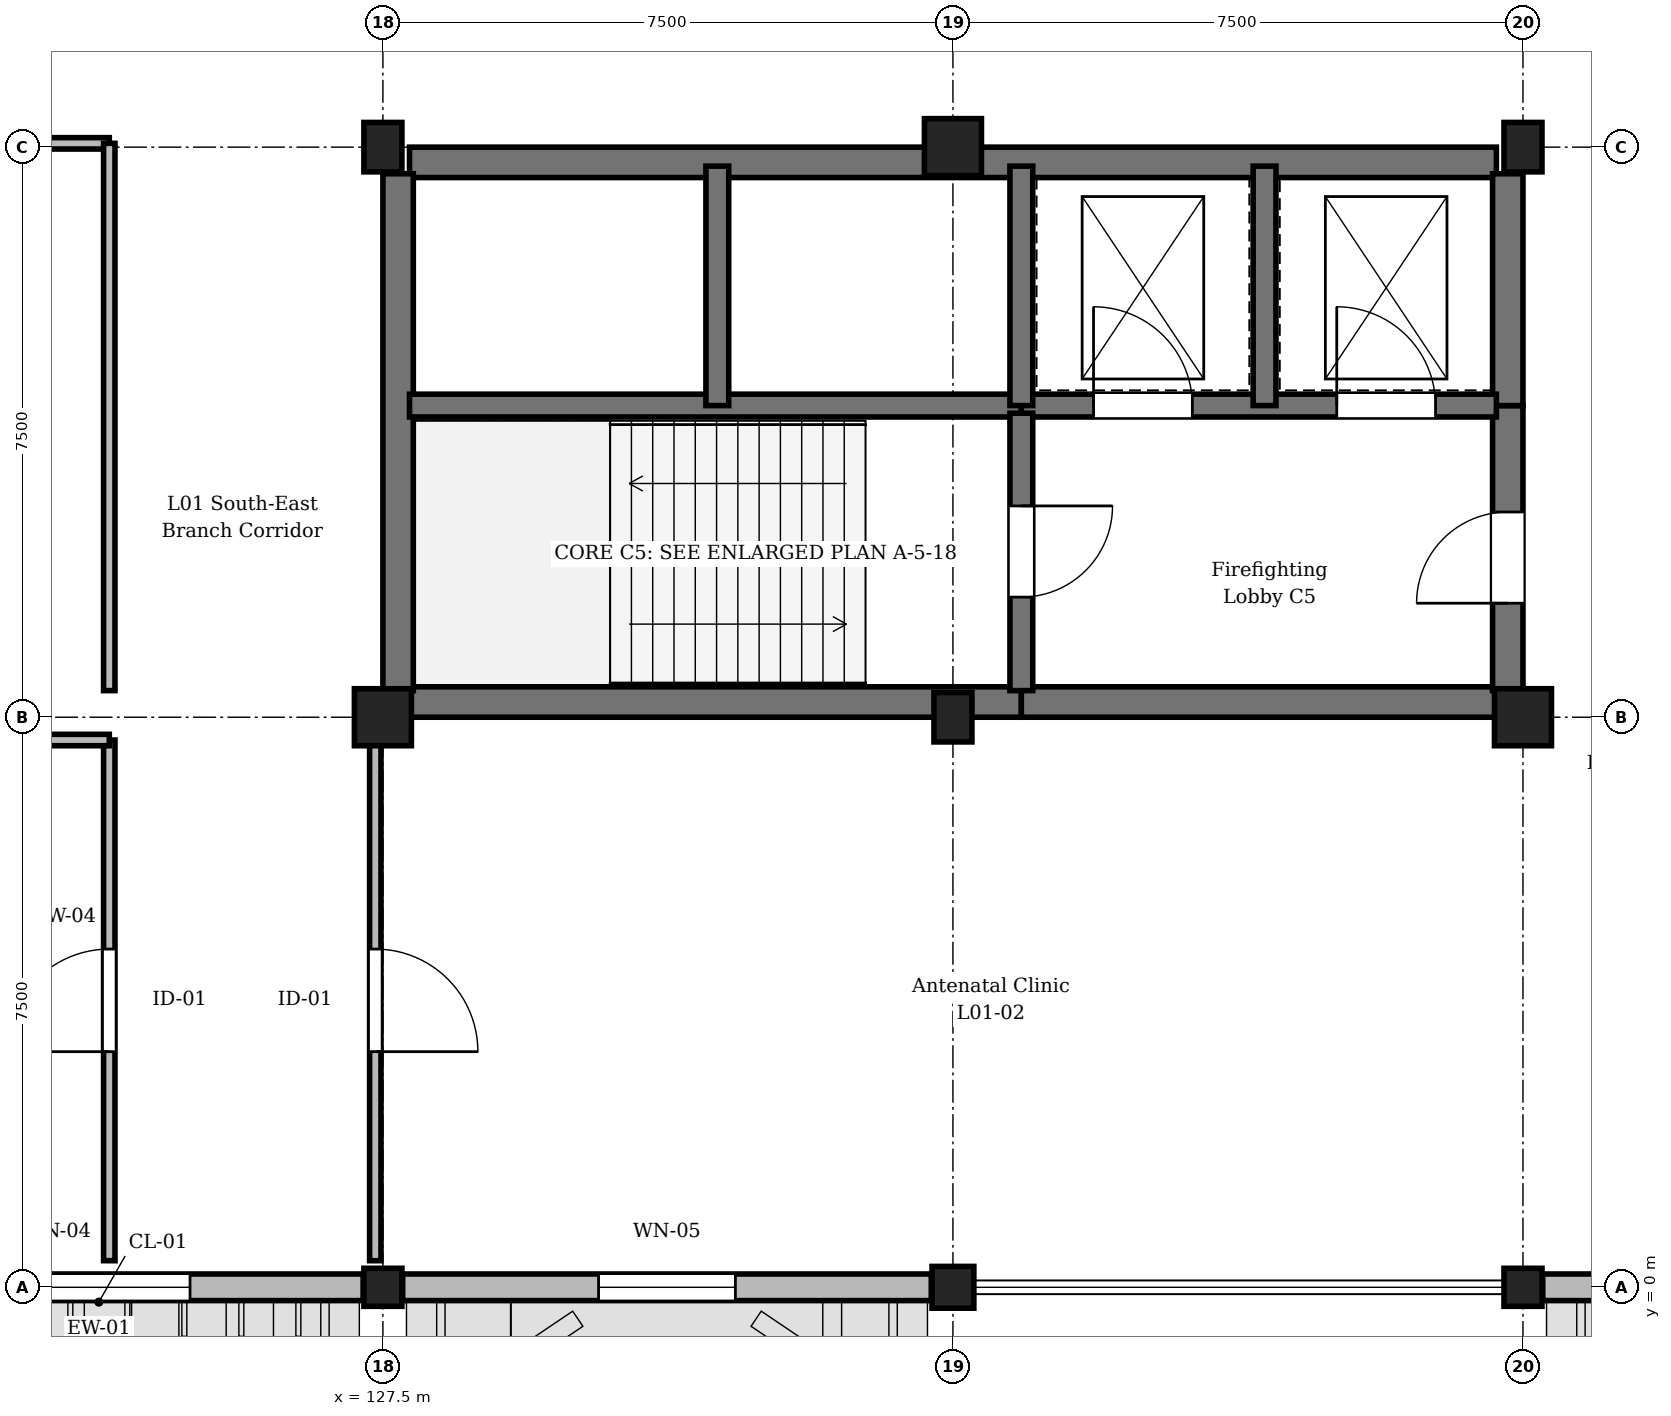
"""IFC4 building model, lengths in metres.
Left out: names, types, materials, properties, quantities, classifications, styles, units other than length and angle.
Written with IfcOpenShell. Run it as: python <this file> out.ifc"""

import sys

from ifc_helpers import new_model, si_unit, direction, frame, frame_2d, origin, origin_2d, place, context, subcontext, project, spatial, rectangle, extrude, element, fill, save


model = new_model("IFC4")
c1 = context("Model", 3, precision=1e-05, world=origin(), true_north=direction((0.0, 1.0)))
c2 = subcontext(c1, "Body", "Model", "MODEL_VIEW")
j1 = project(units=[si_unit("LENGTHUNIT", "METRE"), si_unit("PLANEANGLEUNIT", "RADIAN")], contexts=[c1])
p1 = place(None, origin())
s1 = spatial("IfcSite", under=j1, at=p1, CompositionType="ELEMENT")
p2 = place(p1, origin())
s2 = spatial("IfcBuilding", under=s1, at=p2, CompositionType="ELEMENT")
p3 = place(p2, frame((0.0, 0.0, 4.8)))
s3 = spatial("IfcBuildingStorey", under=s2, at=p3, CompositionType="ELEMENT", Elevation=4.8)
p4 = place(p3, frame((127.5, 0.0, 0.0), z_axis=(0.0, 0.0, 1.0), x_axis=(1.0, 0.0, 0.0)))
e1 = element("IfcColumn", 1, at=p4, inside=s3, PredefinedType="COLUMN", context=c2, shape_type="SweptSolid", body=[
    extrude(rectangle(XDim=0.5, YDim=0.5, at=origin_2d()), origin(), (0.0, 0.0, 1.0), 4.5),
])
p5 = place(p3, frame((127.5, 7.5, 0.0), z_axis=(0.0, 0.0, 1.0), x_axis=(1.0, 0.0, 0.0)))
e2 = element("IfcColumn", 2, at=p5, inside=s3, PredefinedType="COLUMN", context=c2, shape_type="SweptSolid", body=[
    extrude(rectangle(XDim=0.75, YDim=0.75, at=origin_2d()), origin(), (0.0, 0.0, 1.0), 4.5),
])
p6 = place(p3, frame((127.5, 15.0, 0.0), z_axis=(0.0, 0.0, 1.0), x_axis=(1.0, 0.0, 0.0)))
e3 = element("IfcColumn", 3, at=p6, inside=s3, PredefinedType="COLUMN", context=c2, shape_type="SweptSolid", body=[
    extrude(rectangle(XDim=0.5, YDim=0.65, at=origin_2d()), origin(), (0.0, 0.0, 1.0), 4.5),
])
p7 = place(p3, frame((135.0, 0.0, 0.0), z_axis=(0.0, 0.0, 1.0), x_axis=(1.0, 0.0, 0.0)))
e4 = element("IfcColumn", 4, at=p7, inside=s3, PredefinedType="COLUMN", context=c2, shape_type="SweptSolid", body=[
    extrude(rectangle(XDim=0.55, YDim=0.55, at=origin_2d()), origin(), (0.0, 0.0, 1.0), 4.5),
])
p8 = place(p3, frame((135.0, 7.5, 0.0), z_axis=(0.0, 0.0, 1.0), x_axis=(1.0, 0.0, 0.0)))
e5 = element("IfcColumn", 5, at=p8, inside=s3, PredefinedType="COLUMN", context=c2, shape_type="SweptSolid", body=[
    extrude(rectangle(XDim=0.5, YDim=0.65, at=origin_2d()), origin(), (0.0, 0.0, 1.0), 4.5),
])
p9 = place(p3, frame((135.0, 15.0, 0.0), z_axis=(0.0, 0.0, 1.0), x_axis=(1.0, 0.0, 0.0)))
e6 = element("IfcColumn", 6, at=p9, inside=s3, PredefinedType="COLUMN", context=c2, shape_type="SweptSolid", body=[
    extrude(rectangle(XDim=0.75, YDim=0.75, at=origin_2d()), origin(), (0.0, 0.0, 1.0), 4.5),
])
p10 = place(p3, frame((142.5, 0.0, 0.0), z_axis=(0.0, 0.0, 1.0), x_axis=(1.0, 0.0, 0.0)))
e7 = element("IfcColumn", 7, at=p10, inside=s3, PredefinedType="COLUMN", context=c2, shape_type="SweptSolid", body=[
    extrude(rectangle(XDim=0.5, YDim=0.5, at=origin_2d()), origin(), (0.0, 0.0, 1.0), 4.5),
])
p11 = place(p3, frame((142.5, 7.5, 0.0), z_axis=(0.0, 0.0, 1.0), x_axis=(1.0, 0.0, 0.0)))
e8 = element("IfcColumn", 8, at=p11, inside=s3, PredefinedType="COLUMN", context=c2, shape_type="SweptSolid", body=[
    extrude(rectangle(XDim=0.75, YDim=0.75, at=origin_2d()), origin(), (0.0, 0.0, 1.0), 4.5),
])
p12 = place(p3, frame((142.5, 15.0, 0.0), z_axis=(0.0, 0.0, 1.0), x_axis=(1.0, 0.0, 0.0)))
e9 = element("IfcColumn", 9, at=p12, inside=s3, PredefinedType="COLUMN", context=c2, shape_type="SweptSolid", body=[
    extrude(rectangle(XDim=0.5, YDim=0.65, at=origin_2d()), origin(), (0.0, 0.0, 1.0), 4.5),
])
p13 = place(p3, frame((127.24, 0.0, 0.0), z_axis=(0.0, 0.0, 1.0), x_axis=(-1.0, 0.0, 0.0)))
e10 = element("IfcWall", 10, at=p13, inside=s3, PredefinedType="STANDARD", context=c2, shape_type="SweptSolid", body=[
    extrude(rectangle(XDim=6.955, YDim=0.35, at=frame_2d((3.478, 0.0))), origin(), (0.0, 0.0, 1.0), 3.63),
])
p14 = place(p13, frame((2.278, 0.0, 0.9)))
e11 = element("IfcOpeningElement", 11, at=p14, cuts=e10, PredefinedType="OPENING", context=c2, shape_type="SweptSolid", body=[
    extrude(rectangle(XDim=2.4, YDim=2.45, at=frame_2d((1.2, 1.225))), frame((0.0, 0.185, 0.0), z_axis=(0.0, -1.0, 0.0), x_axis=(1.0, 0.0, 0.0)), (0.0, 0.0, 1.0), 0.37),
])
p15 = place(p3, frame((134.715, 0.0, 0.0), z_axis=(0.0, 0.0, 1.0), x_axis=(-1.0, 0.0, 0.0)))
e12 = element("IfcWall", 12, at=p15, inside=s3, PredefinedType="STANDARD", context=c2, shape_type="SweptSolid", body=[
    extrude(rectangle(XDim=6.955, YDim=0.35, at=frame_2d((3.478, 0.0))), origin(), (0.0, 0.0, 1.0), 3.63),
])
p16 = place(p15, frame((2.577, 0.0, 0.9)))
e13 = element("IfcOpeningElement", 13, at=p16, cuts=e12, PredefinedType="OPENING", context=c2, shape_type="SweptSolid", body=[
    extrude(rectangle(XDim=1.8, YDim=2.1, at=frame_2d((0.9, 1.05))), frame((0.0, 0.185, 0.0), z_axis=(0.0, -1.0, 0.0), x_axis=(1.0, 0.0, 0.0)), (0.0, 0.0, 1.0), 0.37),
])
p17 = place(p3, frame((149.715, 0.0, 0.0), z_axis=(0.0, 0.0, 1.0), x_axis=(-1.0, 0.0, 0.0)))
e14 = element("IfcWall", 14, at=p17, inside=s3, PredefinedType="STANDARD", context=c2, shape_type="SweptSolid", body=[
    extrude(rectangle(XDim=6.955, YDim=0.35, at=frame_2d((3.478, 0.0))), origin(), (0.0, 0.0, 1.0), 3.63),
])
p18 = place(p17, frame((2.877, 0.0, 0.9)))
e15 = element("IfcOpeningElement", 15, at=p18, cuts=e14, PredefinedType="OPENING", context=c2, shape_type="SweptSolid", body=[
    extrude(rectangle(XDim=1.2, YDim=2.1, at=frame_2d((0.6, 1.05))), frame((0.0, 0.185, 0.0), z_axis=(0.0, -1.0, 0.0), x_axis=(1.0, 0.0, 0.0)), (0.0, 0.0, 1.0), 0.37),
])
p19 = place(p3, frame((127.85, 7.7, 0.0), z_axis=(0.0, 0.0, 1.0), x_axis=(1.0, 0.0, 0.0)))
e16 = element("IfcWall", 16, at=p19, inside=s3, PredefinedType="SHEAR", context=c2, shape_type="SweptSolid", body=[
    extrude(rectangle(XDim=8.05, YDim=0.4, at=frame_2d((4.025, 0.0))), origin(), (0.0, 0.0, 1.0), 4.18),
])
p20 = place(p3, frame((135.9, 7.7, 0.0), z_axis=(0.0, 0.0, 1.0), x_axis=(1.0, 0.0, 0.0)))
e17 = element("IfcWall", 17, at=p20, inside=s3, PredefinedType="SHEAR", context=c2, shape_type="SweptSolid", body=[
    extrude(rectangle(XDim=6.25, YDim=0.4, at=frame_2d((3.125, 0.0))), origin(), (0.0, 0.0, 1.0), 4.18),
])
p21 = place(p3, frame((127.85, 14.8, 0.0), z_axis=(0.0, 0.0, 1.0), x_axis=(1.0, 0.0, 0.0)))
e18 = element("IfcWall", 18, at=p21, inside=s3, PredefinedType="SHEAR", context=c2, shape_type="SweptSolid", body=[
    extrude(rectangle(XDim=14.3, YDim=0.4, at=frame_2d((7.15, 0.0))), origin(), (0.0, 0.0, 1.0), 4.18),
])
p22 = place(p3, frame((127.7, 7.85, 0.0), z_axis=(0.0, 0.0, 1.0), x_axis=(0.0, 1.0, 0.0)))
e19 = element("IfcWall", 19, at=p22, inside=s3, PredefinedType="SHEAR", context=c2, shape_type="SweptSolid", body=[
    extrude(rectangle(XDim=6.8, YDim=0.4, at=frame_2d((3.4, 0.0))), origin(), (0.0, 0.0, 1.0), 4.18),
])
p23 = place(p3, frame((142.3, 7.85, 0.0), z_axis=(0.0, 0.0, 1.0), x_axis=(0.0, 1.0, 0.0)))
e20 = element("IfcWall", 20, at=p23, inside=s3, PredefinedType="SHEAR", context=c2, shape_type="SweptSolid", body=[
    extrude(rectangle(XDim=3.75, YDim=0.4, at=frame_2d((1.875, 0.0))), origin(), (0.0, 0.0, 1.0), 4.18),
])
p24 = place(p23, frame((1.15, 0.0, 0.0)))
e21 = element("IfcOpeningElement", 21, at=p24, cuts=e20, PredefinedType="OPENING", context=c2, shape_type="SweptSolid", body=[
    extrude(rectangle(XDim=1.2, YDim=2.25, at=frame_2d((0.6, 1.125))), frame((0.0, 0.21, 0.0), z_axis=(0.0, -1.0, 0.0), x_axis=(1.0, 0.0, 0.0)), (0.0, 0.0, 1.0), 0.42),
])
p25 = place(p3, frame((142.3, 11.6, 0.0), z_axis=(0.0, 0.0, 1.0), x_axis=(0.0, 1.0, 0.0)))
e22 = element("IfcWall", 22, at=p25, inside=s3, PredefinedType="SHEAR", context=c2, shape_type="SweptSolid", body=[
    extrude(rectangle(XDim=3.05, YDim=0.4, at=frame_2d((1.525, 0.0))), origin(), (0.0, 0.0, 1.0), 4.18),
])
p26 = place(p3, frame((127.85, 11.6, 0.0), z_axis=(0.0, 0.0, 1.0), x_axis=(1.0, 0.0, 0.0)))
e23 = element("IfcWall", 23, at=p26, inside=s3, PredefinedType="SHEAR", context=c2, shape_type="SweptSolid", body=[
    extrude(rectangle(XDim=8.05, YDim=0.3, at=frame_2d((4.025, 0.0))), origin(), (0.0, 0.0, 1.0), 4.18),
])
p27 = place(p3, frame((135.9, 11.6, 0.0), z_axis=(0.0, 0.0, 1.0), x_axis=(1.0, 0.0, 0.0)))
e24 = element("IfcWall", 24, at=p27, inside=s3, PredefinedType="SHEAR", context=c2, shape_type="SweptSolid", body=[
    extrude(rectangle(XDim=6.25, YDim=0.3, at=frame_2d((3.125, 0.0))), origin(), (0.0, 0.0, 1.0), 4.18),
])
p28 = place(p27, frame((0.95, 0.0, 0.0)))
e25 = element("IfcOpeningElement", 25, at=p28, cuts=e24, PredefinedType="OPENING", context=c2, shape_type="SweptSolid", body=[
    extrude(rectangle(XDim=1.3, YDim=2.2, at=frame_2d((0.65, 1.1))), frame((0.0, 0.16, 0.0), z_axis=(0.0, -1.0, 0.0), x_axis=(1.0, 0.0, 0.0)), (0.0, 0.0, 1.0), 0.32),
])
p29 = place(p27, frame((4.15, 0.0, 0.0)))
e26 = element("IfcOpeningElement", 26, at=p29, cuts=e24, PredefinedType="OPENING", context=c2, shape_type="SweptSolid", body=[
    extrude(rectangle(XDim=1.3, YDim=2.2, at=frame_2d((0.65, 1.1))), frame((0.0, 0.16, 0.0), z_axis=(0.0, -1.0, 0.0), x_axis=(1.0, 0.0, 0.0)), (0.0, 0.0, 1.0), 0.32),
])
p30 = place(p3, frame((135.9, 11.5, 0.0), z_axis=(0.0, 0.0, 1.0), x_axis=(0.0, -1.0, 0.0)))
e27 = element("IfcWall", 27, at=p30, inside=s3, PredefinedType="SHEAR", context=c2, shape_type="SweptSolid", body=[
    extrude(rectangle(XDim=3.65, YDim=0.3, at=frame_2d((1.825, 0.0))), origin(), (0.0, 0.0, 1.0), 4.18),
])
p31 = place(p30, frame((1.22, 0.0, 0.0)))
e28 = element("IfcOpeningElement", 28, at=p31, cuts=e27, PredefinedType="OPENING", context=c2, shape_type="SweptSolid", body=[
    extrude(rectangle(XDim=1.2, YDim=2.25, at=frame_2d((0.6, 1.125))), frame((0.0, 0.16, 0.0), z_axis=(0.0, -1.0, 0.0), x_axis=(1.0, 0.0, 0.0)), (0.0, 0.0, 1.0), 0.32),
])
for number, where, z_axis, x_axis in (
    (29, (131.9, 11.6, 0.0), (0.0, 0.0, 1.0), (0.0, 1.0, 0.0)),
    (30, (135.9, 11.6, 0.0), (0.0, 0.0, 1.0), (0.0, 1.0, 0.0)),
    (31, (139.1, 11.6, 0.0), (0.0, 0.0, 1.0), (0.0, 1.0, 0.0)),
):
    element("IfcWall", number, at=place(p3, frame(where, z_axis=z_axis, x_axis=x_axis)), inside=s3, PredefinedType="SHEAR", context=c2, shape_type="SweptSolid", body=[
        extrude(rectangle(XDim=3.15, YDim=0.3, at=frame_2d((1.575, 0.0))), origin(), (0.0, 0.0, 1.0), 4.18),
    ])
p32 = place(p3, frame((123.9, 0.35, 0.0), z_axis=(0.0, 0.0, 1.0), x_axis=(0.0, 1.0, 0.0)))
e32 = element("IfcWall", 32, at=p32, inside=s3, PredefinedType="PARTITIONING", context=c2, shape_type="SweptSolid", body=[
    extrude(rectangle(XDim=6.85, YDim=0.15, at=frame_2d((3.425, 0.0))), origin(), (0.0, 0.0, 1.0), 3.765),
])
p33 = place(p32, frame((2.75, 0.0, 0.0)))
e33 = element("IfcOpeningElement", 33, at=p33, cuts=e32, PredefinedType="OPENING", context=c2, shape_type="SweptSolid", body=[
    extrude(rectangle(XDim=1.35, YDim=2.25, at=frame_2d((0.675, 1.125))), frame((0.0, 0.085, 0.0), z_axis=(0.0, -1.0, 0.0), x_axis=(1.0, 0.0, 0.0)), (0.0, 0.0, 1.0), 0.17),
])
p34 = place(p3, frame((127.4, 7.2, 0.0), z_axis=(0.0, 0.0, 1.0), x_axis=(0.0, -1.0, 0.0)))
e34 = element("IfcWall", 34, at=p34, inside=s3, PredefinedType="PARTITIONING", context=c2, shape_type="SweptSolid", body=[
    extrude(rectangle(XDim=6.85, YDim=0.15, at=frame_2d((3.425, 0.0))), origin(), (0.0, 0.0, 1.0), 3.565),
])
p35 = place(p34, frame((2.75, 0.0, 0.0)))
e35 = element("IfcOpeningElement", 35, at=p35, cuts=e34, PredefinedType="OPENING", context=c2, shape_type="SweptSolid", body=[
    extrude(rectangle(XDim=1.35, YDim=2.25, at=frame_2d((0.675, 1.125))), frame((0.0, 0.085, 0.0), z_axis=(0.0, -1.0, 0.0), x_axis=(1.0, 0.0, 0.0)), (0.0, 0.0, 1.0), 0.17),
])
p36 = place(p3, frame((123.9, 15.05, 0.0), z_axis=(0.0, 0.0, 1.0), x_axis=(-1.0, 0.0, 0.0)))
e36 = element("IfcWall", 36, at=p36, inside=s3, PredefinedType="PARTITIONING", context=c2, shape_type="SweptSolid", body=[
    extrude(rectangle(XDim=11.05, YDim=0.15, at=frame_2d((5.525, 0.0))), origin(), (0.0, 0.0, 1.0), 3.515),
])
p37 = place(p36, frame((6.76, 0.0, 0.0)))
e37 = element("IfcOpeningElement", 37, at=p37, cuts=e36, PredefinedType="OPENING", context=c2, shape_type="SweptSolid", body=[
    extrude(rectangle(XDim=1.25, YDim=2.2, at=frame_2d((0.625, 1.1))), frame((0.0, 0.085, 0.0), z_axis=(0.0, -1.0, 0.0), x_axis=(1.0, 0.0, 0.0)), (0.0, 0.0, 1.0), 0.17),
])
p38 = place(p3, frame((112.85, 7.2, 0.0), z_axis=(0.0, 0.0, 1.0), x_axis=(1.0, 0.0, 0.0)))
e38 = element("IfcWall", 38, at=p38, inside=s3, PredefinedType="PARTITIONING", context=c2, shape_type="SweptSolid", body=[
    extrude(rectangle(XDim=11.05, YDim=0.15, at=frame_2d((5.525, 0.0))), origin(), (0.0, 0.0, 1.0), 3.515),
])
p39 = place(p3, frame((123.9, 7.85, 0.0), z_axis=(0.0, 0.0, 1.0), x_axis=(0.0, 1.0, 0.0)))
e39 = element("IfcWall", 39, at=p39, inside=s3, PredefinedType="PARTITIONING", context=c2, shape_type="SweptSolid", body=[
    extrude(rectangle(XDim=7.2, YDim=0.15, at=frame_2d((3.6, 0.0))), origin(), (0.0, 0.0, 1.0), 4.165),
])
p40 = place(p14, origin())
e40 = element("IfcWindow", 40, at=p40, inside=s3, PartitioningType="SINGLE_PANEL", PredefinedType="WINDOW", context=c2, shape_type="SweptSolid", body=[
    extrude(rectangle(XDim=2.4, YDim=2.45, at=frame_2d((1.2, 1.225))), frame((0.0, 0.03, 0.0), z_axis=(0.0, -1.0, 0.0), x_axis=(1.0, 0.0, 0.0)), (0.0, 0.0, 1.0), 0.06),
])
fill(e11, e40)
p41 = place(p16, origin())
e41 = element("IfcWindow", 41, at=p41, inside=s3, PartitioningType="SINGLE_PANEL", PredefinedType="WINDOW", context=c2, shape_type="SweptSolid", body=[
    extrude(rectangle(XDim=1.8, YDim=2.1, at=frame_2d((0.9, 1.05))), frame((0.0, 0.03, 0.0), z_axis=(0.0, -1.0, 0.0), x_axis=(1.0, 0.0, 0.0)), (0.0, 0.0, 1.0), 0.06),
])
fill(e13, e41)
p42 = place(p24, origin())
e42 = element("IfcDoor", 42, at=p42, inside=s3, OperationType="SINGLE_SWING_LEFT", PredefinedType="DOOR", context=c2, shape_type="SweptSolid", body=[
    extrude(rectangle(XDim=1.2, YDim=2.25, at=frame_2d((0.6, 1.125))), frame((0.0, 0.025, 0.0), z_axis=(0.0, -1.0, 0.0), x_axis=(1.0, 0.0, 0.0)), (0.0, 0.0, 1.0), 0.05),
])
fill(e21, e42)
p43 = place(p28, origin())
e43 = element("IfcDoor", 43, at=p43, inside=s3, OperationType="DOUBLE_DOOR_SLIDING", PredefinedType="DOOR", context=c2, shape_type="SweptSolid", body=[
    extrude(rectangle(XDim=1.3, YDim=2.2, at=frame_2d((0.65, 1.1))), frame((0.0, 0.025, 0.0), z_axis=(0.0, -1.0, 0.0), x_axis=(1.0, 0.0, 0.0)), (0.0, 0.0, 1.0), 0.05),
])
fill(e25, e43)
p44 = place(p29, origin())
e44 = element("IfcDoor", 44, at=p44, inside=s3, OperationType="DOUBLE_DOOR_SLIDING", PredefinedType="DOOR", context=c2, shape_type="SweptSolid", body=[
    extrude(rectangle(XDim=1.3, YDim=2.2, at=frame_2d((0.65, 1.1))), frame((0.0, 0.025, 0.0), z_axis=(0.0, -1.0, 0.0), x_axis=(1.0, 0.0, 0.0)), (0.0, 0.0, 1.0), 0.05),
])
fill(e26, e44)
p45 = place(p31, origin())
e45 = element("IfcDoor", 45, at=p45, inside=s3, OperationType="SINGLE_SWING_LEFT", PredefinedType="DOOR", context=c2, shape_type="SweptSolid", body=[
    extrude(rectangle(XDim=1.2, YDim=2.25, at=frame_2d((0.6, 1.125))), frame((0.0, 0.025, 0.0), z_axis=(0.0, -1.0, 0.0), x_axis=(1.0, 0.0, 0.0)), (0.0, 0.0, 1.0), 0.05),
])
fill(e28, e45)
p46 = place(p33, origin())
e46 = element("IfcDoor", 46, at=p46, inside=s3, OperationType="SINGLE_SWING_LEFT", PredefinedType="DOOR", context=c2, shape_type="SweptSolid", body=[
    extrude(rectangle(XDim=1.35, YDim=2.25, at=frame_2d((0.675, 1.125))), frame((0.0, 0.025, 0.0), z_axis=(0.0, -1.0, 0.0), x_axis=(1.0, 0.0, 0.0)), (0.0, 0.0, 1.0), 0.05),
])
fill(e33, e46)
p47 = place(p35, origin())
e47 = element("IfcDoor", 47, at=p47, inside=s3, OperationType="SINGLE_SWING_RIGHT", PredefinedType="DOOR", context=c2, shape_type="SweptSolid", body=[
    extrude(rectangle(XDim=1.35, YDim=2.25, at=frame_2d((0.675, 1.125))), frame((0.0, 0.025, 0.0), z_axis=(0.0, -1.0, 0.0), x_axis=(1.0, 0.0, 0.0)), (0.0, 0.0, 1.0), 0.05),
])
fill(e35, e47)
save(model, sys.argv[1])
